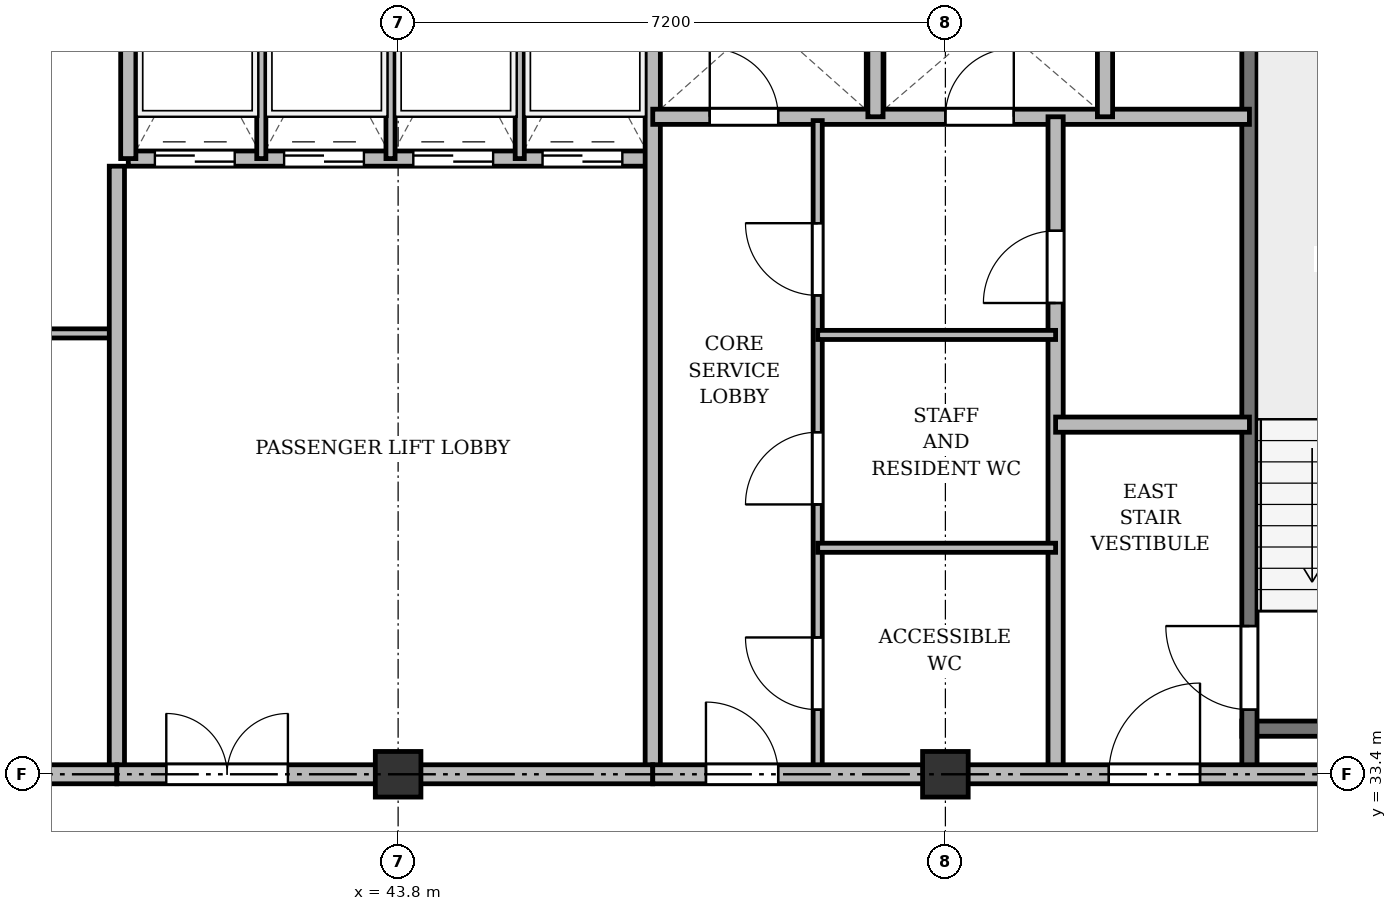
"""IFC4 building model, lengths in metres.
Left out: names, types, materials, properties, quantities, classifications, styles, units other than length and angle.
Written with IfcOpenShell. Run it as: python <this file> out.ifc"""

import sys

from ifc_helpers import new_model, si_unit, direction, frame, frame_2d, origin, origin_2d, place, context, subcontext, project, spatial, rectangle, extrude, source, transform, mapped, element, fill, save


model = new_model("IFC4")
c1 = context("Model", 3, precision=1e-05, world=origin(), true_north=direction((0.0, 1.0)))
c2 = subcontext(c1, "Body", "Model", "MODEL_VIEW")
j1 = project(units=[si_unit("LENGTHUNIT", "METRE"), si_unit("PLANEANGLEUNIT", "RADIAN")], contexts=[c1])
p1 = place(None, origin())
s1 = spatial("IfcSite", under=j1, at=p1, CompositionType="ELEMENT")
p2 = place(p1, origin())
s2 = spatial("IfcBuilding", under=s1, at=p2, CompositionType="ELEMENT")
p3 = place(p2, frame((0.0, 0.0, 284.7)))
s3 = spatial("IfcBuildingStorey", under=s2, at=p3, CompositionType="ELEMENT", Elevation=284.7)
m1 = source(origin(), c2, "Body", "SweptSolid", [
    extrude(rectangle(XDim=0.6, YDim=0.6, at=origin_2d()), origin(), (0.0, 0.0, 1.0), 3.6),
])
for number, where, z_axis, x_axis in (
    (1, (43.8, 33.4, 0.0), (0.0, 0.0, 1.0), (1.0, 0.0, 0.0)),
    (2, (51.0, 33.4, 0.0), (0.0, 0.0, 1.0), (1.0, 0.0, 0.0)),
):
    element("IfcColumn", number, at=place(p3, frame(where, z_axis=z_axis, x_axis=x_axis)), inside=s3, PredefinedType="COLUMN", context=c2, shape_type="MappedRepresentation", body=[
        mapped(m1, transform((0.0, 0.0, 0.0), x_axis=(1.0, 0.0, 0.0), y_axis=(0.0, 1.0, 0.0), z_axis=(0.0, 0.0, 1.0), scale=1.0)),
    ])
p4 = place(p3, frame((54.9, 34.0, 0.0), z_axis=(0.0, 0.0, 1.0), x_axis=(1.0, 0.0, 0.0)))
e3 = element("IfcWall", 3, at=p4, inside=s3, PredefinedType="SHEAR", context=c2, shape_type="SweptSolid", body=[
    extrude(rectangle(XDim=3.4, YDim=0.2, at=frame_2d((1.7, 0.0))), origin(), (0.0, 0.0, 1.0), 3.37),
])
p5 = place(p3, frame((55.0, 33.4, 0.0), z_axis=(0.0, 0.0, 1.0), x_axis=(0.0, 1.0, 0.0)))
e4 = element("IfcWall", 4, at=p5, inside=s3, PredefinedType="SHEAR", context=c2, shape_type="SweptSolid", body=[
    extrude(rectangle(XDim=11.1, YDim=0.2, at=frame_2d((5.55, 0.0))), origin(), (0.0, 0.0, 1.0), 3.37),
])
p6 = place(p5, frame((0.85, 0.0, 0.0)))
e5 = element("IfcOpeningElement", 5, at=p6, cuts=e4, PredefinedType="OPENING", context=c2, shape_type="SweptSolid", body=[
    extrude(rectangle(XDim=1.1, YDim=2.15, at=frame_2d((0.55, 1.075))), frame((0.0, 0.11, 0.0), z_axis=(0.0, -1.0, 0.0), x_axis=(1.0, 0.0, 0.0)), (0.0, 0.0, 1.0), 0.22),
])
p7 = place(p3, frame((33.3, 39.2, 0.0), z_axis=(0.0, 0.0, 1.0), x_axis=(1.0, 0.0, 0.0)))
e6 = element("IfcWall", 6, at=p7, inside=s3, PredefinedType="PARTITIONING", context=c2, shape_type="SweptSolid", body=[
    extrude(rectangle(XDim=6.8, YDim=0.12, at=frame_2d((3.4, 0.0))), origin(), (0.0, 0.0, 1.0), 3.37),
])
p8 = place(p7, frame((2.6, 0.0, 0.0)))
e7 = element("IfcOpeningElement", 7, at=p8, cuts=e6, PredefinedType="OPENING", context=c2, shape_type="SweptSolid", body=[
    extrude(rectangle(XDim=0.95, YDim=2.15, at=frame_2d((0.475, 1.075))), frame((0.0, 0.07, 0.0), z_axis=(0.0, -1.0, 0.0), x_axis=(1.0, 0.0, 0.0)), (0.0, 0.0, 1.0), 0.14),
])
p9 = place(p3, frame((40.1, 33.4, 0.0), z_axis=(0.0, 0.0, 1.0), x_axis=(0.0, 1.0, 0.0)))
e8 = element("IfcWall", 8, at=p9, inside=s3, PredefinedType="SOLIDWALL", context=c2, shape_type="SweptSolid", body=[
    extrude(rectangle(XDim=8.0, YDim=0.2, at=frame_2d((4.0, 0.0))), origin(), (0.0, 0.0, 1.0), 2.92),
])
p10 = place(p3, frame((40.25, 41.5, 0.0), z_axis=(0.0, 0.0, 1.0), x_axis=(1.0, 0.0, 0.0)))
e9 = element("IfcWall", 9, at=p10, inside=s3, PredefinedType="SOLIDWALL", context=c2, shape_type="SweptSolid", body=[
    extrude(rectangle(XDim=6.9, YDim=0.2, at=frame_2d((3.45, 0.0))), origin(), (0.0, 0.0, 1.0), 3.37),
])
p11 = place(p10, frame((0.35, 0.0, 0.0)))
e10 = element("IfcOpeningElement", 10, at=p11, cuts=e9, PredefinedType="OPENING", context=c2, shape_type="SweptSolid", body=[
    extrude(rectangle(XDim=1.05, YDim=2.15, at=frame_2d((0.525, 1.075))), frame((0.0, 0.11, 0.0), z_axis=(0.0, -1.0, 0.0), x_axis=(1.0, 0.0, 0.0)), (0.0, 0.0, 1.0), 0.22),
])
p12 = place(p10, frame((2.05, 0.0, 0.0)))
e11 = element("IfcOpeningElement", 11, at=p12, cuts=e9, PredefinedType="OPENING", context=c2, shape_type="SweptSolid", body=[
    extrude(rectangle(XDim=1.05, YDim=2.15, at=frame_2d((0.525, 1.075))), frame((0.0, 0.11, 0.0), z_axis=(0.0, -1.0, 0.0), x_axis=(1.0, 0.0, 0.0)), (0.0, 0.0, 1.0), 0.22),
])
p13 = place(p10, frame((3.75, 0.0, 0.0)))
e12 = element("IfcOpeningElement", 12, at=p13, cuts=e9, PredefinedType="OPENING", context=c2, shape_type="SweptSolid", body=[
    extrude(rectangle(XDim=1.05, YDim=2.15, at=frame_2d((0.525, 1.075))), frame((0.0, 0.11, 0.0), z_axis=(0.0, -1.0, 0.0), x_axis=(1.0, 0.0, 0.0)), (0.0, 0.0, 1.0), 0.22),
])
p14 = place(p10, frame((5.45, 0.0, 0.0)))
e13 = element("IfcOpeningElement", 13, at=p14, cuts=e9, PredefinedType="OPENING", context=c2, shape_type="SweptSolid", body=[
    extrude(rectangle(XDim=1.05, YDim=2.15, at=frame_2d((0.525, 1.075))), frame((0.0, 0.11, 0.0), z_axis=(0.0, -1.0, 0.0), x_axis=(1.0, 0.0, 0.0)), (0.0, 0.0, 1.0), 0.22),
])
p15 = place(p3, frame((40.25, 41.5, 0.0), z_axis=(0.0, 0.0, 1.0), x_axis=(0.0, 1.0, 0.0)))
e14 = element("IfcWall", 14, at=p15, inside=s3, PredefinedType="SOLIDWALL", context=c2, shape_type="SweptSolid", body=[
    extrude(rectangle(XDim=3.2, YDim=0.2, at=frame_2d((1.6, 0.0))), origin(), (0.0, 0.0, 1.0), 3.37),
])
for number, where, z_axis, x_axis in (
    (15, (42.0, 41.5, 0.0), (0.0, 0.0, 1.0), (0.0, 1.0, 0.0)),
    (16, (43.7, 41.5, 0.0), (0.0, 0.0, 1.0), (0.0, 1.0, 0.0)),
    (17, (45.4, 41.5, 0.0), (0.0, 0.0, 1.0), (0.0, 1.0, 0.0)),
):
    element("IfcWall", number, at=place(p3, frame(where, z_axis=z_axis, x_axis=x_axis)), inside=s3, PredefinedType="PARTITIONING", context=c2, shape_type="SweptSolid", body=[
        extrude(rectangle(XDim=3.2, YDim=0.12, at=frame_2d((1.6, 0.0))), origin(), (0.0, 0.0, 1.0), 3.37),
    ])
p16 = place(p3, frame((47.15, 33.4, 0.0), z_axis=(0.0, 0.0, 1.0), x_axis=(0.0, 1.0, 0.0)))
e18 = element("IfcWall", 18, at=p16, inside=s3, PredefinedType="SOLIDWALL", context=c2, shape_type="SweptSolid", body=[
    extrude(rectangle(XDim=11.3, YDim=0.2, at=frame_2d((5.65, 0.0))), origin(), (0.0, 0.0, 1.0), 2.92),
])
p17 = place(p3, frame((33.3, 33.4, 0.0), z_axis=(0.0, 0.0, 1.0), x_axis=(1.0, 0.0, 0.0)))
e19 = element("IfcWall", 19, at=p17, inside=s3, PredefinedType="PARTITIONING", context=c2, shape_type="SweptSolid", body=[
    extrude(rectangle(XDim=6.8, YDim=0.25, at=frame_2d((3.4, 0.0))), origin(), (0.0, 0.0, 1.0), 2.92),
])
p18 = place(p17, frame((2.4, 0.0, 0.0)))
e20 = element("IfcOpeningElement", 20, at=p18, cuts=e19, PredefinedType="OPENING", context=c2, shape_type="SweptSolid", body=[
    extrude(rectangle(XDim=1.0, YDim=2.15, at=frame_2d((0.5, 1.075))), frame((0.0, 0.135, 0.0), z_axis=(0.0, -1.0, 0.0), x_axis=(1.0, 0.0, 0.0)), (0.0, 0.0, 1.0), 0.27),
])
p19 = place(p3, frame((40.1, 33.4, 0.0), z_axis=(0.0, 0.0, 1.0), x_axis=(1.0, 0.0, 0.0)))
e21 = element("IfcWall", 21, at=p19, inside=s3, PredefinedType="PARTITIONING", context=c2, shape_type="SweptSolid", body=[
    extrude(rectangle(XDim=7.05, YDim=0.25, at=frame_2d((3.525, 0.0))), origin(), (0.0, 0.0, 1.0), 2.92),
])
p20 = place(p19, frame((0.65, 0.0, 0.0)))
e22 = element("IfcOpeningElement", 22, at=p20, cuts=e21, PredefinedType="OPENING", context=c2, shape_type="SweptSolid", body=[
    extrude(rectangle(XDim=1.6, YDim=2.2, at=frame_2d((0.8, 1.1))), frame((0.0, 0.135, 0.0), z_axis=(0.0, -1.0, 0.0), x_axis=(1.0, 0.0, 0.0)), (0.0, 0.0, 1.0), 0.27),
])
p21 = place(p3, frame((47.15, 42.05, 0.0), z_axis=(0.0, 0.0, 1.0), x_axis=(1.0, 0.0, 0.0)))
e23 = element("IfcWall", 23, at=p21, inside=s3, PredefinedType="SOLIDWALL", context=c2, shape_type="SweptSolid", body=[
    extrude(rectangle(XDim=7.85, YDim=0.2, at=frame_2d((3.925, 0.0))), origin(), (0.0, 0.0, 1.0), 2.87),
])
p22 = place(p21, frame((0.75, 0.0, 0.0)))
e24 = element("IfcOpeningElement", 24, at=p22, cuts=e23, PredefinedType="OPENING", context=c2, shape_type="SweptSolid", body=[
    extrude(rectangle(XDim=0.9, YDim=2.1, at=frame_2d((0.45, 1.05))), frame((0.0, 0.11, 0.0), z_axis=(0.0, -1.0, 0.0), x_axis=(1.0, 0.0, 0.0)), (0.0, 0.0, 1.0), 0.22),
])
p23 = place(p21, frame((3.85, 0.0, 0.0)))
e25 = element("IfcOpeningElement", 25, at=p23, cuts=e23, PredefinedType="OPENING", context=c2, shape_type="SweptSolid", body=[
    extrude(rectangle(XDim=0.9, YDim=2.1, at=frame_2d((0.45, 1.05))), frame((0.0, 0.11, 0.0), z_axis=(0.0, -1.0, 0.0), x_axis=(1.0, 0.0, 0.0)), (0.0, 0.0, 1.0), 0.22),
])
for number, where, z_axis, x_axis in (
    (26, (50.08, 42.05, 0.0), (0.0, 0.0, 1.0), (0.0, 1.0, 0.0)),
    (27, (53.1, 42.05, 0.0), (0.0, 0.0, 1.0), (0.0, 1.0, 0.0)),
):
    element("IfcWall", number, at=place(p3, frame(where, z_axis=z_axis, x_axis=x_axis)), inside=s3, PredefinedType="SOLIDWALL", context=c2, shape_type="SweptSolid", body=[
        extrude(rectangle(XDim=2.65, YDim=0.2, at=frame_2d((1.325, 0.0))), origin(), (0.0, 0.0, 1.0), 3.37),
    ])
p24 = place(p3, frame((52.45, 33.4, 0.0), z_axis=(0.0, 0.0, 1.0), x_axis=(0.0, 1.0, 0.0)))
e28 = element("IfcWall", 28, at=p24, inside=s3, PredefinedType="PARTITIONING", context=c2, shape_type="SweptSolid", body=[
    extrude(rectangle(XDim=8.65, YDim=0.2, at=frame_2d((4.325, 0.0))), origin(), (0.0, 0.0, 1.0), 2.92),
])
p25 = place(p24, frame((6.2, 0.0, 0.0)))
e29 = element("IfcOpeningElement", 29, at=p25, cuts=e28, PredefinedType="OPENING", context=c2, shape_type="SweptSolid", body=[
    extrude(rectangle(XDim=0.95, YDim=2.15, at=frame_2d((0.475, 1.075))), frame((0.0, 0.11, 0.0), z_axis=(0.0, -1.0, 0.0), x_axis=(1.0, 0.0, 0.0)), (0.0, 0.0, 1.0), 0.22),
])
p26 = place(p3, frame((52.45, 38.0, 0.0), z_axis=(0.0, 0.0, 1.0), x_axis=(1.0, 0.0, 0.0)))
e30 = element("IfcWall", 30, at=p26, inside=s3, PredefinedType="PARTITIONING", context=c2, shape_type="SweptSolid", body=[
    extrude(rectangle(XDim=2.55, YDim=0.2, at=frame_2d((1.275, 0.0))), origin(), (0.0, 0.0, 1.0), 3.37),
])
p27 = place(p3, frame((49.32, 33.4, 0.0), z_axis=(0.0, 0.0, 1.0), x_axis=(0.0, 1.0, 0.0)))
e31 = element("IfcWall", 31, at=p27, inside=s3, PredefinedType="PARTITIONING", context=c2, shape_type="SweptSolid", body=[
    extrude(rectangle(XDim=8.6, YDim=0.12, at=frame_2d((4.3, 0.0))), origin(), (0.0, 0.0, 1.0), 2.92),
])
p28 = place(p27, frame((0.85, 0.0, 0.0)))
e32 = element("IfcOpeningElement", 32, at=p28, cuts=e31, PredefinedType="OPENING", context=c2, shape_type="SweptSolid", body=[
    extrude(rectangle(XDim=0.95, YDim=2.15, at=frame_2d((0.475, 1.075))), frame((0.0, 0.07, 0.0), z_axis=(0.0, -1.0, 0.0), x_axis=(1.0, 0.0, 0.0)), (0.0, 0.0, 1.0), 0.14),
])
p29 = place(p27, frame((3.55, 0.0, 0.0)))
e33 = element("IfcOpeningElement", 33, at=p29, cuts=e31, PredefinedType="OPENING", context=c2, shape_type="SweptSolid", body=[
    extrude(rectangle(XDim=0.95, YDim=2.15, at=frame_2d((0.475, 1.075))), frame((0.0, 0.07, 0.0), z_axis=(0.0, -1.0, 0.0), x_axis=(1.0, 0.0, 0.0)), (0.0, 0.0, 1.0), 0.14),
])
p30 = place(p27, frame((6.3, 0.0, 0.0)))
e34 = element("IfcOpeningElement", 34, at=p30, cuts=e31, PredefinedType="OPENING", context=c2, shape_type="SweptSolid", body=[
    extrude(rectangle(XDim=0.95, YDim=2.15, at=frame_2d((0.475, 1.075))), frame((0.0, 0.07, 0.0), z_axis=(0.0, -1.0, 0.0), x_axis=(1.0, 0.0, 0.0)), (0.0, 0.0, 1.0), 0.14),
])
for number, where, z_axis, x_axis in (
    (35, (49.32, 36.38, 0.0), (0.0, 0.0, 1.0), (1.0, 0.0, 0.0)),
    (36, (49.32, 39.18, 0.0), (0.0, 0.0, 1.0), (1.0, 0.0, 0.0)),
):
    element("IfcWall", number, at=place(p3, frame(where, z_axis=z_axis, x_axis=x_axis)), inside=s3, PredefinedType="PARTITIONING", context=c2, shape_type="SweptSolid", body=[
        extrude(rectangle(XDim=3.13, YDim=0.12, at=frame_2d((1.565, 0.0))), origin(), (0.0, 0.0, 1.0), 2.87),
    ])
p31 = place(p3, frame((47.15, 33.4, 0.0), z_axis=(0.0, 0.0, 1.0), x_axis=(1.0, 0.0, 0.0)))
e37 = element("IfcWall", 37, at=p31, inside=s3, PredefinedType="PARTITIONING", context=c2, shape_type="SweptSolid", body=[
    extrude(rectangle(XDim=11.15, YDim=0.25, at=frame_2d((5.575, 0.0))), origin(), (0.0, 0.0, 1.0), 2.92),
])
p32 = place(p31, frame((0.7, 0.0, 0.0)))
e38 = element("IfcOpeningElement", 38, at=p32, cuts=e37, PredefinedType="OPENING", context=c2, shape_type="SweptSolid", body=[
    extrude(rectangle(XDim=0.95, YDim=2.15, at=frame_2d((0.475, 1.075))), frame((0.0, 0.135, 0.0), z_axis=(0.0, -1.0, 0.0), x_axis=(1.0, 0.0, 0.0)), (0.0, 0.0, 1.0), 0.27),
])
p33 = place(p31, frame((6.0, 0.0, 0.0)))
e39 = element("IfcOpeningElement", 39, at=p33, cuts=e37, PredefinedType="OPENING", context=c2, shape_type="SweptSolid", body=[
    extrude(rectangle(XDim=1.2, YDim=2.15, at=frame_2d((0.6, 1.075))), frame((0.0, 0.135, 0.0), z_axis=(0.0, -1.0, 0.0), x_axis=(1.0, 0.0, 0.0)), (0.0, 0.0, 1.0), 0.27),
])
m2 = source(origin(), c2, "Body", "SweptSolid", [
    extrude(rectangle(XDim=1.1, YDim=2.15, at=frame_2d((0.55, 1.075))), frame((0.0, 0.025, 0.0), z_axis=(0.0, -1.0, 0.0), x_axis=(1.0, 0.0, 0.0)), (0.0, 0.0, 1.0), 0.05),
])
p34 = place(p6, origin())
e40 = element("IfcDoor", 40, at=p34, inside=s3, OperationType="SINGLE_SWING_RIGHT", PredefinedType="DOOR", context=c2, shape_type="MappedRepresentation", body=[
    mapped(m2, transform((0.0, 0.0, 0.0), x_axis=(1.0, 0.0, 0.0), y_axis=(0.0, 1.0, 0.0), z_axis=(0.0, 0.0, 1.0), scale=1.0)),
])
fill(e5, e40)
m3 = source(origin(), c2, "Body", "SweptSolid", [
    extrude(rectangle(XDim=1.05, YDim=2.15, at=frame_2d((0.525, 1.075))), frame((0.0, 0.025, 0.0), z_axis=(0.0, -1.0, 0.0), x_axis=(1.0, 0.0, 0.0)), (0.0, 0.0, 1.0), 0.05),
])
p35 = place(p11, origin())
e41 = element("IfcDoor", 41, at=p35, inside=s3, OperationType="DOUBLE_DOOR_SLIDING", PredefinedType="DOOR", context=c2, shape_type="MappedRepresentation", body=[
    mapped(m3, transform((0.0, 0.0, 0.0), x_axis=(1.0, 0.0, 0.0), y_axis=(0.0, 1.0, 0.0), z_axis=(0.0, 0.0, 1.0), scale=1.0)),
])
fill(e10, e41)
p36 = place(p12, origin())
e42 = element("IfcDoor", 42, at=p36, inside=s3, OperationType="DOUBLE_DOOR_SLIDING", PredefinedType="DOOR", context=c2, shape_type="MappedRepresentation", body=[
    mapped(m3, transform((0.0, 0.0, 0.0), x_axis=(1.0, 0.0, 0.0), y_axis=(0.0, 1.0, 0.0), z_axis=(0.0, 0.0, 1.0), scale=1.0)),
])
fill(e11, e42)
p37 = place(p13, origin())
e43 = element("IfcDoor", 43, at=p37, inside=s3, OperationType="DOUBLE_DOOR_SLIDING", PredefinedType="DOOR", context=c2, shape_type="MappedRepresentation", body=[
    mapped(m3, transform((0.0, 0.0, 0.0), x_axis=(1.0, 0.0, 0.0), y_axis=(0.0, 1.0, 0.0), z_axis=(0.0, 0.0, 1.0), scale=1.0)),
])
fill(e12, e43)
p38 = place(p14, origin())
e44 = element("IfcDoor", 44, at=p38, inside=s3, OperationType="DOUBLE_DOOR_SLIDING", PredefinedType="DOOR", context=c2, shape_type="MappedRepresentation", body=[
    mapped(m3, transform((0.0, 0.0, 0.0), x_axis=(1.0, 0.0, 0.0), y_axis=(0.0, 1.0, 0.0), z_axis=(0.0, 0.0, 1.0), scale=1.0)),
])
fill(e13, e44)
m4 = source(origin(), c2, "Body", "SweptSolid", [
    extrude(rectangle(XDim=1.6, YDim=2.2, at=frame_2d((0.8, 1.1))), frame((0.0, 0.025, 0.0), z_axis=(0.0, -1.0, 0.0), x_axis=(1.0, 0.0, 0.0)), (0.0, 0.0, 1.0), 0.05),
])
p39 = place(p20, origin())
e45 = element("IfcDoor", 45, at=p39, inside=s3, OperationType="DOUBLE_DOOR_SINGLE_SWING", PredefinedType="DOOR", context=c2, shape_type="MappedRepresentation", body=[
    mapped(m4, transform((0.0, 0.0, 0.0), x_axis=(1.0, 0.0, 0.0), y_axis=(0.0, 1.0, 0.0), z_axis=(0.0, 0.0, 1.0), scale=1.0)),
])
fill(e22, e45)
m5 = source(origin(), c2, "Body", "SweptSolid", [
    extrude(rectangle(XDim=0.9, YDim=2.1, at=frame_2d((0.45, 1.05))), frame((0.0, 0.025, 0.0), z_axis=(0.0, -1.0, 0.0), x_axis=(1.0, 0.0, 0.0)), (0.0, 0.0, 1.0), 0.05),
])
p40 = place(p22, origin())
e46 = element("IfcDoor", 46, at=p40, inside=s3, OperationType="SINGLE_SWING_LEFT", PredefinedType="DOOR", context=c2, shape_type="MappedRepresentation", body=[
    mapped(m5, transform((0.0, 0.0, 0.0), x_axis=(1.0, 0.0, 0.0), y_axis=(0.0, 1.0, 0.0), z_axis=(0.0, 0.0, 1.0), scale=1.0)),
])
fill(e24, e46)
p41 = place(p23, origin())
e47 = element("IfcDoor", 47, at=p41, inside=s3, OperationType="SINGLE_SWING_RIGHT", PredefinedType="DOOR", context=c2, shape_type="MappedRepresentation", body=[
    mapped(m5, transform((0.0, 0.0, 0.0), x_axis=(1.0, 0.0, 0.0), y_axis=(0.0, 1.0, 0.0), z_axis=(0.0, 0.0, 1.0), scale=1.0)),
])
fill(e25, e47)
m6 = source(origin(), c2, "Body", "SweptSolid", [
    extrude(rectangle(XDim=0.95, YDim=2.15, at=frame_2d((0.475, 1.075))), frame((0.0, 0.025, 0.0), z_axis=(0.0, -1.0, 0.0), x_axis=(1.0, 0.0, 0.0)), (0.0, 0.0, 1.0), 0.05),
])
p42 = place(p25, origin())
e48 = element("IfcDoor", 48, at=p42, inside=s3, OperationType="SINGLE_SWING_LEFT", PredefinedType="DOOR", context=c2, shape_type="MappedRepresentation", body=[
    mapped(m6, transform((0.0, 0.0, 0.0), x_axis=(1.0, 0.0, 0.0), y_axis=(0.0, 1.0, 0.0), z_axis=(0.0, 0.0, 1.0), scale=1.0)),
])
fill(e29, e48)
p43 = place(p28, origin())
e49 = element("IfcDoor", 49, at=p43, inside=s3, OperationType="SINGLE_SWING_RIGHT", PredefinedType="DOOR", context=c2, shape_type="MappedRepresentation", body=[
    mapped(m6, transform((0.0, 0.0, 0.0), x_axis=(1.0, 0.0, 0.0), y_axis=(0.0, 1.0, 0.0), z_axis=(0.0, 0.0, 1.0), scale=1.0)),
])
fill(e32, e49)
p44 = place(p29, origin())
e50 = element("IfcDoor", 50, at=p44, inside=s3, OperationType="SINGLE_SWING_LEFT", PredefinedType="DOOR", context=c2, shape_type="MappedRepresentation", body=[
    mapped(m6, transform((0.0, 0.0, 0.0), x_axis=(1.0, 0.0, 0.0), y_axis=(0.0, 1.0, 0.0), z_axis=(0.0, 0.0, 1.0), scale=1.0)),
])
fill(e33, e50)
p45 = place(p30, origin())
e51 = element("IfcDoor", 51, at=p45, inside=s3, OperationType="SINGLE_SWING_RIGHT", PredefinedType="DOOR", context=c2, shape_type="MappedRepresentation", body=[
    mapped(m6, transform((0.0, 0.0, 0.0), x_axis=(1.0, 0.0, 0.0), y_axis=(0.0, 1.0, 0.0), z_axis=(0.0, 0.0, 1.0), scale=1.0)),
])
fill(e34, e51)
p46 = place(p32, origin())
e52 = element("IfcDoor", 52, at=p46, inside=s3, OperationType="SINGLE_SWING_LEFT", PredefinedType="DOOR", context=c2, shape_type="MappedRepresentation", body=[
    mapped(m6, transform((0.0, 0.0, 0.0), x_axis=(1.0, 0.0, 0.0), y_axis=(0.0, 1.0, 0.0), z_axis=(0.0, 0.0, 1.0), scale=1.0)),
])
fill(e38, e52)
m7 = source(origin(), c2, "Body", "SweptSolid", [
    extrude(rectangle(XDim=1.2, YDim=2.15, at=frame_2d((0.6, 1.075))), frame((0.0, 0.025, 0.0), z_axis=(0.0, -1.0, 0.0), x_axis=(1.0, 0.0, 0.0)), (0.0, 0.0, 1.0), 0.05),
])
p47 = place(p33, origin())
e53 = element("IfcDoor", 53, at=p47, inside=s3, OperationType="SINGLE_SWING_RIGHT", PredefinedType="DOOR", context=c2, shape_type="MappedRepresentation", body=[
    mapped(m7, transform((0.0, 0.0, 0.0), x_axis=(1.0, 0.0, 0.0), y_axis=(0.0, 1.0, 0.0), z_axis=(0.0, 0.0, 1.0), scale=1.0)),
])
fill(e39, e53)
save(model, sys.argv[1])
